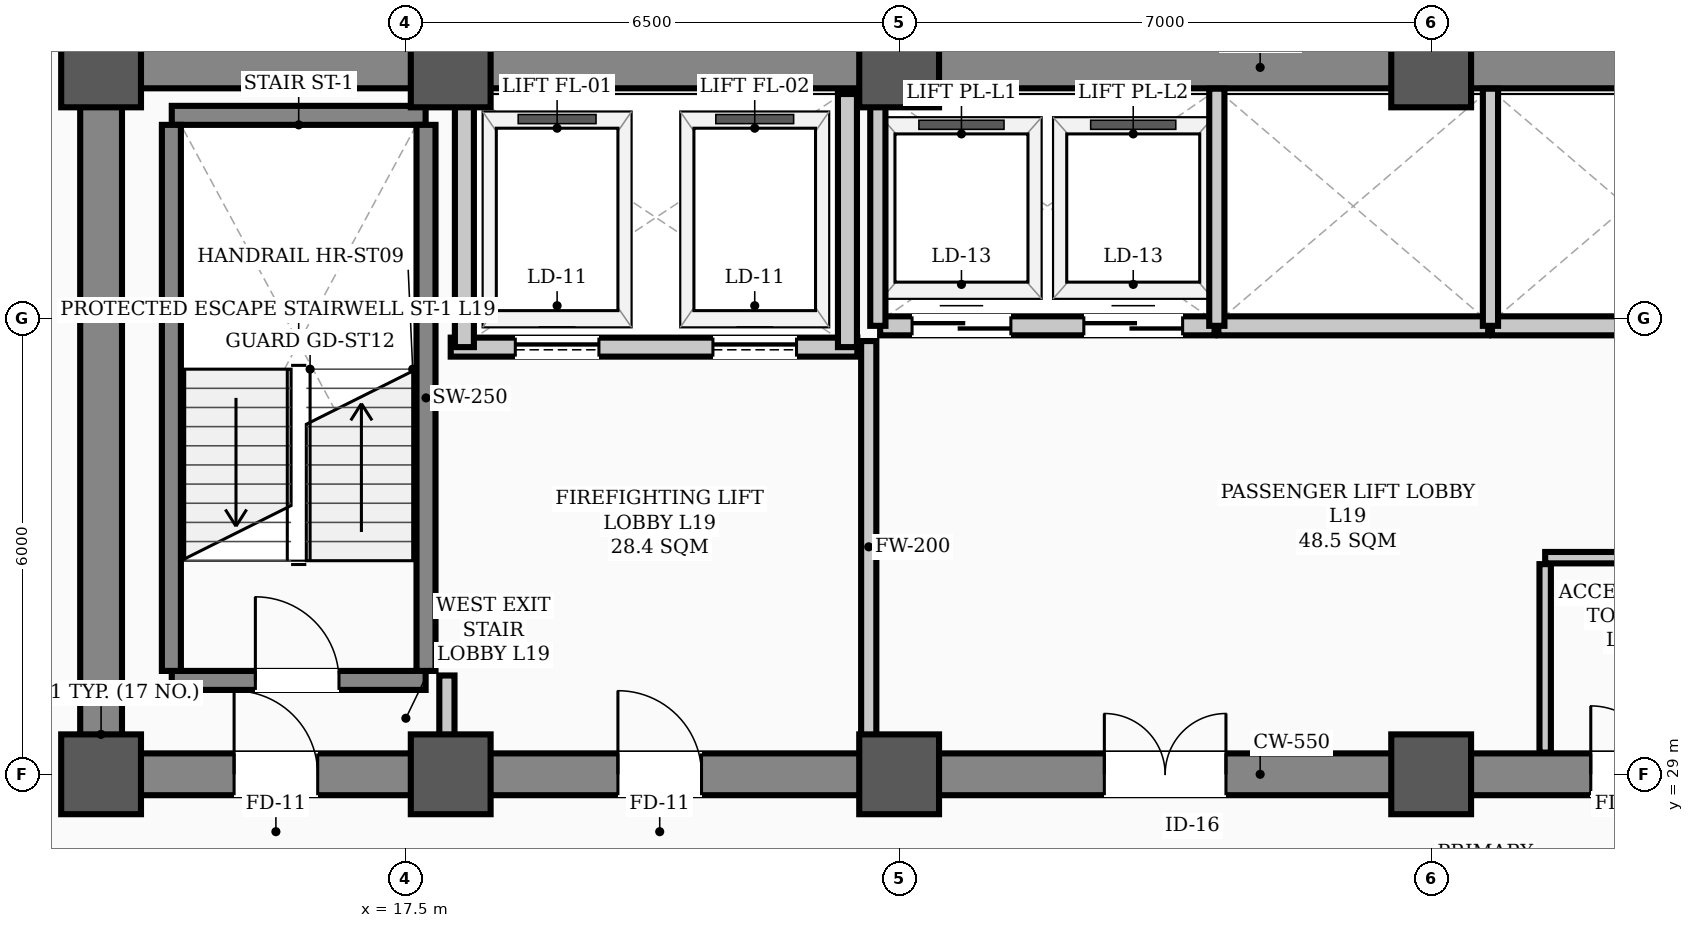
"""IFC4 building model, lengths in metres.
Left out: names, types, materials, properties, quantities, classifications, styles, units other than length and angle.
Written with IfcOpenShell. Run it as: python <this file> out.ifc"""

import sys

from ifc_helpers import new_model, si_unit, direction, frame, frame_2d, origin, origin_2d, place, context, subcontext, project, spatial, rectangle, hollow_rectangle, extrude, element, fill, save


model = new_model("IFC4")
c1 = context("Model", 3, precision=1e-05, world=origin(), true_north=direction((0.0, 1.0)))
c2 = subcontext(c1, "Body", "Model", "MODEL_VIEW")
j1 = project(units=[si_unit("LENGTHUNIT", "METRE"), si_unit("PLANEANGLEUNIT", "RADIAN")], contexts=[c1])
p1 = place(None, origin())
s1 = spatial("IfcSite", under=j1, at=p1, CompositionType="ELEMENT")
p2 = place(p1, origin())
s2 = spatial("IfcBuilding", under=s1, at=p2, CompositionType="ELEMENT")
p3 = place(p2, frame((0.0, 0.0, 77.2)))
s3 = spatial("IfcBuildingStorey", under=s2, at=p3, CompositionType="ELEMENT", Elevation=77.2)
for number, where, z_axis, x_axis in (
    (1, (13.5, 29.0, 0.0), (0.0, 0.0, 1.0), (1.0, 0.0, 0.0)),
    (2, (13.5, 38.3, 0.0), (0.0, 0.0, 1.0), (1.0, 0.0, 0.0)),
    (3, (18.1, 29.0, 0.0), (0.0, 0.0, 1.0), (1.0, 0.0, 0.0)),
    (4, (18.1, 38.3, 0.0), (0.0, 0.0, 1.0), (1.0, 0.0, 0.0)),
    (5, (24.0, 29.0, 0.0), (0.0, 0.0, 1.0), (1.0, 0.0, 0.0)),
    (6, (24.0, 38.3, 0.0), (0.0, 0.0, 1.0), (1.0, 0.0, 0.0)),
    (7, (31.0, 29.0, 0.0), (0.0, 0.0, 1.0), (1.0, 0.0, 0.0)),
    (8, (31.0, 38.3, 0.0), (0.0, 0.0, 1.0), (1.0, 0.0, 0.0)),
):
    element("IfcColumn", number, at=place(p3, frame(where, z_axis=z_axis, x_axis=x_axis)), inside=s3, PredefinedType="COLUMN", context=c2, shape_type="SweptSolid", body=[
        extrude(hollow_rectangle(XDim=1.05, YDim=1.05, WallThickness=0.038, InnerFilletRadius=0.019, OuterFilletRadius=0.057, at=origin_2d()), origin(), (0.0, 0.0, 1.0), 3.9),
    ])
p4 = place(p3, frame((13.5, 29.0, 0.0), z_axis=(0.0, 0.0, 1.0), x_axis=(1.0, 0.0, 0.0)))
e9 = element("IfcWall", 9, at=p4, inside=s3, PredefinedType="SHEAR", context=c2, shape_type="SweptSolid", body=[
    extrude(rectangle(XDim=30.5, YDim=0.55, at=frame_2d((15.25, 0.0))), origin(), (0.0, 0.0, 1.0), 3.66),
])
p5 = place(p4, frame((1.75, 0.0, 0.0)))
e10 = element("IfcOpeningElement", 10, at=p5, cuts=e9, PredefinedType="OPENING", context=c2, shape_type="SweptSolid", body=[
    extrude(rectangle(XDim=1.1, YDim=2.08, at=frame_2d((0.55, 1.04))), frame((0.0, 0.285, 0.0), z_axis=(0.0, -1.0, 0.0), x_axis=(1.0, 0.0, 0.0)), (0.0, 0.0, 1.0), 0.57),
])
p6 = place(p4, frame((26.7, 0.0, 0.0)))
e11 = element("IfcOpeningElement", 11, at=p6, cuts=e9, PredefinedType="OPENING", context=c2, shape_type="SweptSolid", body=[
    extrude(rectangle(XDim=1.1, YDim=2.08, at=frame_2d((0.55, 1.04))), frame((0.0, 0.285, 0.0), z_axis=(0.0, -1.0, 0.0), x_axis=(1.0, 0.0, 0.0)), (0.0, 0.0, 1.0), 0.57),
])
p7 = place(p4, frame((6.8, 0.0, 0.0)))
e12 = element("IfcOpeningElement", 12, at=p7, cuts=e9, PredefinedType="OPENING", context=c2, shape_type="SweptSolid", body=[
    extrude(rectangle(XDim=1.1, YDim=2.08, at=frame_2d((0.55, 1.04))), frame((0.0, 0.285, 0.0), z_axis=(0.0, -1.0, 0.0), x_axis=(1.0, 0.0, 0.0)), (0.0, 0.0, 1.0), 0.57),
])
p8 = place(p4, frame((13.2, 0.0, 0.0)))
e13 = element("IfcOpeningElement", 13, at=p8, cuts=e9, PredefinedType="OPENING", context=c2, shape_type="SweptSolid", body=[
    extrude(rectangle(XDim=1.6, YDim=2.08, at=frame_2d((0.8, 1.04))), frame((0.0, 0.285, 0.0), z_axis=(0.0, -1.0, 0.0), x_axis=(1.0, 0.0, 0.0)), (0.0, 0.0, 1.0), 0.57),
])
p9 = place(p4, frame((19.6, 0.0, 0.0)))
e14 = element("IfcOpeningElement", 14, at=p9, cuts=e9, PredefinedType="OPENING", context=c2, shape_type="SweptSolid", body=[
    extrude(rectangle(XDim=0.9, YDim=2.08, at=frame_2d((0.45, 1.04))), frame((0.0, 0.285, 0.0), z_axis=(0.0, -1.0, 0.0), x_axis=(1.0, 0.0, 0.0)), (0.0, 0.0, 1.0), 0.57),
])
p10 = place(p4, frame((21.6, 0.0, 0.0)))
e15 = element("IfcOpeningElement", 15, at=p10, cuts=e9, PredefinedType="OPENING", context=c2, shape_type="SweptSolid", body=[
    extrude(rectangle(XDim=0.9, YDim=2.08, at=frame_2d((0.45, 1.04))), frame((0.0, 0.285, 0.0), z_axis=(0.0, -1.0, 0.0), x_axis=(1.0, 0.0, 0.0)), (0.0, 0.0, 1.0), 0.57),
])
p11 = place(p3, frame((13.5, 38.3, 0.0), z_axis=(0.0, 0.0, 1.0), x_axis=(1.0, 0.0, 0.0)))
e16 = element("IfcWall", 16, at=p11, inside=s3, PredefinedType="SHEAR", context=c2, shape_type="SweptSolid", body=[
    extrude(rectangle(XDim=30.5, YDim=0.55, at=frame_2d((15.25, 0.0))), origin(), (0.0, 0.0, 1.0), 3.66),
])
p12 = place(p3, frame((13.5, 29.35, 0.0), z_axis=(0.0, 0.0, 1.0), x_axis=(0.0, 1.0, 0.0)))
e17 = element("IfcWall", 17, at=p12, inside=s3, PredefinedType="SHEAR", context=c2, shape_type="SweptSolid", body=[
    extrude(rectangle(XDim=8.6, YDim=0.55, at=frame_2d((4.3, 0.0))), origin(), (0.0, 0.0, 1.0), 3.66),
])
p13 = place(p3, frame((14.43, 30.235, 0.0), z_axis=(0.0, 0.0, 1.0), x_axis=(1.0, 0.0, 0.0)))
e18 = element("IfcWall", 18, at=p13, inside=s3, PredefinedType="STANDARD", context=c2, shape_type="SweptSolid", body=[
    extrude(rectangle(XDim=3.34, YDim=0.25, at=frame_2d((1.67, 0.0))), origin(), (0.0, 0.0, 1.0), 3.66),
])
p14 = place(p13, frame((1.1, 0.0, 0.0)))
e19 = element("IfcOpeningElement", 19, at=p14, cuts=e18, PredefinedType="OPENING", context=c2, shape_type="SweptSolid", body=[
    extrude(rectangle(XDim=1.1, YDim=2.08, at=frame_2d((0.55, 1.04))), frame((0.0, 0.135, 0.0), z_axis=(0.0, -1.0, 0.0), x_axis=(1.0, 0.0, 0.0)), (0.0, 0.0, 1.0), 0.27),
])
p15 = place(p3, frame((14.43, 37.669, 0.0), z_axis=(0.0, 0.0, 1.0), x_axis=(1.0, 0.0, 0.0)))
e20 = element("IfcWall", 20, at=p15, inside=s3, PredefinedType="STANDARD", context=c2, shape_type="SweptSolid", body=[
    extrude(rectangle(XDim=3.34, YDim=0.25, at=frame_2d((1.67, 0.0))), origin(), (0.0, 0.0, 1.0), 3.66),
])
for number, where, z_axis, x_axis in (
    (21, (14.425, 30.36, 0.0), (0.0, 0.0, 1.0), (0.0, 1.0, 0.0)),
    (22, (17.775, 30.36, 0.0), (0.0, 0.0, 1.0), (0.0, 1.0, 0.0)),
):
    element("IfcWall", number, at=place(p3, frame(where, z_axis=z_axis, x_axis=x_axis)), inside=s3, PredefinedType="STANDARD", context=c2, shape_type="SweptSolid", body=[
        extrude(rectangle(XDim=7.184, YDim=0.25, at=frame_2d((3.592, 0.0))), origin(), (0.0, 0.0, 1.0), 3.66),
    ])
p16 = place(p3, frame((18.1, 34.62, 0.0), z_axis=(0.0, 0.0, 1.0), x_axis=(1.0, 0.0, 0.0)))
e23 = element("IfcWall", 23, at=p16, inside=s3, PredefinedType="STANDARD", context=c2, shape_type="SweptSolid", body=[
    extrude(rectangle(XDim=5.35, YDim=0.25, at=frame_2d((2.675, 0.0))), origin(), (0.0, 0.0, 1.0), 3.66),
])
p17 = place(p16, frame((0.85, 0.0, 0.0)))
e24 = element("IfcOpeningElement", 24, at=p17, cuts=e23, PredefinedType="OPENING", context=c2, shape_type="SweptSolid", body=[
    extrude(rectangle(XDim=1.1, YDim=2.08, at=frame_2d((0.55, 1.04))), frame((0.0, 0.135, 0.0), z_axis=(0.0, -1.0, 0.0), x_axis=(1.0, 0.0, 0.0)), (0.0, 0.0, 1.0), 0.27),
])
p18 = place(p16, frame((3.45, 0.0, 0.0)))
e25 = element("IfcOpeningElement", 25, at=p18, cuts=e23, PredefinedType="OPENING", context=c2, shape_type="SweptSolid", body=[
    extrude(rectangle(XDim=1.1, YDim=2.08, at=frame_2d((0.55, 1.04))), frame((0.0, 0.135, 0.0), z_axis=(0.0, -1.0, 0.0), x_axis=(1.0, 0.0, 0.0)), (0.0, 0.0, 1.0), 0.27),
])
for number, where, z_axis, x_axis in (
    (26, (18.28, 34.62, 0.0), (0.0, 0.0, 1.0), (0.0, 1.0, 0.0)),
    (27, (23.32, 34.62, 0.0), (0.0, 0.0, 1.0), (0.0, 1.0, 0.0)),
):
    element("IfcWall", number, at=place(p3, frame(where, z_axis=z_axis, x_axis=x_axis)), inside=s3, PredefinedType="STANDARD", context=c2, shape_type="SweptSolid", body=[
        extrude(rectangle(XDim=3.33, YDim=0.25, at=frame_2d((1.665, 0.0))), origin(), (0.0, 0.0, 1.0), 2.24),
    ])
p19 = place(p3, frame((23.75, 34.9, 0.0), z_axis=(0.0, 0.0, 1.0), x_axis=(1.0, 0.0, 0.0)))
e28 = element("IfcWall", 28, at=p19, inside=s3, PredefinedType="STANDARD", context=c2, shape_type="SweptSolid", body=[
    extrude(rectangle(XDim=4.4, YDim=0.25, at=frame_2d((2.2, 0.0))), origin(), (0.0, 0.0, 1.0), 3.66),
])
p20 = place(p19, frame((0.42, 0.0, 0.0)))
e29 = element("IfcOpeningElement", 29, at=p20, cuts=e28, PredefinedType="OPENING", context=c2, shape_type="SweptSolid", body=[
    extrude(rectangle(XDim=1.3, YDim=2.08, at=frame_2d((0.65, 1.04))), frame((0.0, 0.135, 0.0), z_axis=(0.0, -1.0, 0.0), x_axis=(1.0, 0.0, 0.0)), (0.0, 0.0, 1.0), 0.27),
])
p21 = place(p19, frame((2.68, 0.0, 0.0)))
e30 = element("IfcOpeningElement", 30, at=p21, cuts=e28, PredefinedType="OPENING", context=c2, shape_type="SweptSolid", body=[
    extrude(rectangle(XDim=1.3, YDim=2.08, at=frame_2d((0.65, 1.04))), frame((0.0, 0.135, 0.0), z_axis=(0.0, -1.0, 0.0), x_axis=(1.0, 0.0, 0.0)), (0.0, 0.0, 1.0), 0.27),
])
p22 = place(p3, frame((28.2, 34.9, 0.0), z_axis=(0.0, 0.0, 1.0), x_axis=(1.0, 0.0, 0.0)))
e31 = element("IfcWall", 31, at=p22, inside=s3, PredefinedType="STANDARD", context=c2, shape_type="SweptSolid", body=[
    extrude(rectangle(XDim=3.55, YDim=0.25, at=frame_2d((1.775, 0.0))), origin(), (0.0, 0.0, 1.0), 3.66),
])
p23 = place(p3, frame((31.8, 34.9, 0.0), z_axis=(0.0, 0.0, 1.0), x_axis=(1.0, 0.0, 0.0)))
e32 = element("IfcWall", 32, at=p23, inside=s3, PredefinedType="STANDARD", context=c2, shape_type="SweptSolid", body=[
    extrude(rectangle(XDim=3.6, YDim=0.25, at=frame_2d((1.8, 0.0))), origin(), (0.0, 0.0, 1.0), 3.66),
])
p24 = place(p3, frame((32.5, 31.85, 0.0), z_axis=(0.0, 0.0, 1.0), x_axis=(1.0, 0.0, 0.0)))
e33 = element("IfcWall", 33, at=p24, inside=s3, PredefinedType="PARTITIONING", context=c2, shape_type="SweptSolid", body=[
    extrude(rectangle(XDim=4.1, YDim=0.15, at=frame_2d((2.05, 0.0))), origin(), (0.0, 0.0, 1.0), 3.66),
])
p25 = place(p3, frame((18.05, 29.285, 0.0), z_axis=(0.0, 0.0, 1.0), x_axis=(0.0, 1.0, 0.0)))
e34 = element("IfcWall", 34, at=p25, inside=s3, PredefinedType="STANDARD", context=c2, shape_type="SweptSolid", body=[
    extrude(rectangle(XDim=1.015, YDim=0.2, at=frame_2d((0.508, 0.0))), origin(), (0.0, 0.0, 1.0), 2.24),
])
p26 = place(p3, frame((23.6, 29.285, 0.0), z_axis=(0.0, 0.0, 1.0), x_axis=(0.0, 1.0, 0.0)))
e35 = element("IfcWall", 35, at=p26, inside=s3, PredefinedType="STANDARD", context=c2, shape_type="SweptSolid", body=[
    extrude(rectangle(XDim=5.415, YDim=0.2, at=frame_2d((2.708, 0.0))), origin(), (0.0, 0.0, 1.0), 2.24),
])
p27 = place(p3, frame((32.5, 29.285, 0.0), z_axis=(0.0, 0.0, 1.0), x_axis=(0.0, 1.0, 0.0)))
e36 = element("IfcWall", 36, at=p27, inside=s3, PredefinedType="PARTITIONING", context=c2, shape_type="SweptSolid", body=[
    extrude(rectangle(XDim=2.48, YDim=0.15, at=frame_2d((1.24, 0.0))), origin(), (0.0, 0.0, 1.0), 2.24),
])
for number, where, z_axis, x_axis in (
    (37, (23.72, 34.9, 0.0), (0.0, 0.0, 1.0), (0.0, 1.0, 0.0)),
    (38, (28.18, 34.9, 0.0), (0.0, 0.0, 1.0), (0.0, 1.0, 0.0)),
    (39, (31.78, 34.9, 0.0), (0.0, 0.0, 1.0), (0.0, 1.0, 0.0)),
):
    element("IfcWall", number, at=place(p3, frame(where, z_axis=z_axis, x_axis=x_axis)), inside=s3, PredefinedType="STANDARD", context=c2, shape_type="SweptSolid", body=[
        extrude(rectangle(XDim=3.12, YDim=0.2, at=frame_2d((1.56, 0.0))), origin(), (0.0, 0.0, 1.0), 2.24),
    ])
p28 = place(p14, origin())
e40 = element("IfcDoor", 40, at=p28, inside=s3, OperationType="SINGLE_SWING_LEFT", PredefinedType="DOOR", context=c2, shape_type="SweptSolid", body=[
    extrude(rectangle(XDim=1.1, YDim=2.08, at=frame_2d((0.55, 1.04))), frame((0.0, 0.025, 0.0), z_axis=(0.0, -1.0, 0.0), x_axis=(1.0, 0.0, 0.0)), (0.0, 0.0, 1.0), 0.05),
])
fill(e19, e40)
p29 = place(p5, origin())
e41 = element("IfcDoor", 41, at=p29, inside=s3, OperationType="SINGLE_SWING_LEFT", PredefinedType="DOOR", context=c2, shape_type="SweptSolid", body=[
    extrude(rectangle(XDim=1.1, YDim=2.08, at=frame_2d((0.55, 1.04))), frame((0.0, 0.025, 0.0), z_axis=(0.0, -1.0, 0.0), x_axis=(1.0, 0.0, 0.0)), (0.0, 0.0, 1.0), 0.05),
])
fill(e10, e41)
p30 = place(p7, origin())
e42 = element("IfcDoor", 42, at=p30, inside=s3, OperationType="SINGLE_SWING_LEFT", PredefinedType="DOOR", context=c2, shape_type="SweptSolid", body=[
    extrude(rectangle(XDim=1.1, YDim=2.08, at=frame_2d((0.55, 1.04))), frame((0.0, 0.025, 0.0), z_axis=(0.0, -1.0, 0.0), x_axis=(1.0, 0.0, 0.0)), (0.0, 0.0, 1.0), 0.05),
])
fill(e12, e42)
p31 = place(p8, origin())
e43 = element("IfcDoor", 43, at=p31, inside=s3, OperationType="DOUBLE_DOOR_SINGLE_SWING", PredefinedType="DOOR", context=c2, shape_type="SweptSolid", body=[
    extrude(rectangle(XDim=1.6, YDim=2.08, at=frame_2d((0.8, 1.04))), frame((0.0, 0.025, 0.0), z_axis=(0.0, -1.0, 0.0), x_axis=(1.0, 0.0, 0.0)), (0.0, 0.0, 1.0), 0.05),
])
fill(e13, e43)
p32 = place(p9, origin())
e44 = element("IfcDoor", 44, at=p32, inside=s3, OperationType="SINGLE_SWING_LEFT", PredefinedType="DOOR", context=c2, shape_type="SweptSolid", body=[
    extrude(rectangle(XDim=0.9, YDim=2.08, at=frame_2d((0.45, 1.04))), frame((0.0, 0.025, 0.0), z_axis=(0.0, -1.0, 0.0), x_axis=(1.0, 0.0, 0.0)), (0.0, 0.0, 1.0), 0.05),
])
fill(e14, e44)
p33 = place(p17, origin())
e45 = element("IfcDoor", 45, at=p33, inside=s3, OperationType="SLIDING_TO_LEFT", PredefinedType="DOOR", context=c2, shape_type="SweptSolid", body=[
    extrude(rectangle(XDim=1.1, YDim=2.08, at=frame_2d((0.55, 1.04))), frame((0.0, 0.025, 0.0), z_axis=(0.0, -1.0, 0.0), x_axis=(1.0, 0.0, 0.0)), (0.0, 0.0, 1.0), 0.05),
])
fill(e24, e45)
p34 = place(p18, origin())
e46 = element("IfcDoor", 46, at=p34, inside=s3, OperationType="SLIDING_TO_LEFT", PredefinedType="DOOR", context=c2, shape_type="SweptSolid", body=[
    extrude(rectangle(XDim=1.1, YDim=2.08, at=frame_2d((0.55, 1.04))), frame((0.0, 0.025, 0.0), z_axis=(0.0, -1.0, 0.0), x_axis=(1.0, 0.0, 0.0)), (0.0, 0.0, 1.0), 0.05),
])
fill(e25, e46)
p35 = place(p20, origin())
e47 = element("IfcDoor", 47, at=p35, inside=s3, OperationType="DOUBLE_DOOR_SLIDING", PredefinedType="DOOR", context=c2, shape_type="SweptSolid", body=[
    extrude(rectangle(XDim=1.3, YDim=2.08, at=frame_2d((0.65, 1.04))), frame((0.0, 0.025, 0.0), z_axis=(0.0, -1.0, 0.0), x_axis=(1.0, 0.0, 0.0)), (0.0, 0.0, 1.0), 0.05),
])
fill(e29, e47)
p36 = place(p21, origin())
e48 = element("IfcDoor", 48, at=p36, inside=s3, OperationType="DOUBLE_DOOR_SLIDING", PredefinedType="DOOR", context=c2, shape_type="SweptSolid", body=[
    extrude(rectangle(XDim=1.3, YDim=2.08, at=frame_2d((0.65, 1.04))), frame((0.0, 0.025, 0.0), z_axis=(0.0, -1.0, 0.0), x_axis=(1.0, 0.0, 0.0)), (0.0, 0.0, 1.0), 0.05),
])
fill(e30, e48)
save(model, sys.argv[1])
